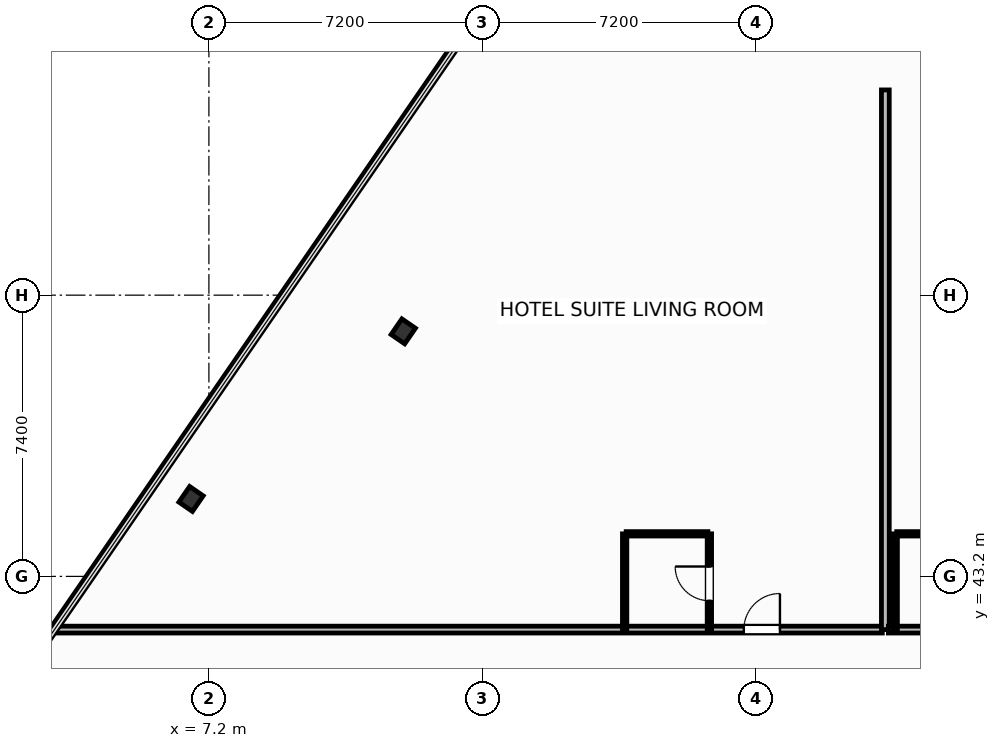
"""IFC4 building model, lengths in metres.
Left out: names, types, materials, properties, quantities, classifications, styles, units other than length and angle.
Written with IfcOpenShell. Run it as: python <this file> out.ifc"""

import sys

from ifc_helpers import new_model, si_unit, direction, frame, frame_2d, origin, origin_2d, place, context, subcontext, project, spatial, rectangle, i_section, extrude, element, fill, save


model = new_model("IFC4")
c1 = context("Model", 3, precision=1e-05, world=origin(), true_north=direction((0.0, 1.0)))
c2 = subcontext(c1, "Body", "Model", "MODEL_VIEW")
j1 = project(units=[si_unit("LENGTHUNIT", "METRE"), si_unit("PLANEANGLEUNIT", "RADIAN")], contexts=[c1])
p1 = place(None, origin())
s1 = spatial("IfcSite", under=j1, at=p1, CompositionType="ELEMENT")
p2 = place(p1, origin())
s2 = spatial("IfcBuilding", under=s1, at=p2, CompositionType="ELEMENT")
p3 = place(p2, frame((0.0, 0.0, 64.0)))
s3 = spatial("IfcBuildingStorey", under=s2, at=p3, CompositionType="ELEMENT", Elevation=64.0)
for number, where, z_axis, x_axis in (
    (1, (12.315, 49.647, 0.0), (0.0, 0.0, 1.0), (0.824, -0.567, 0.0)),
    (2, (6.73, 45.238, 0.0), (0.0, 0.0, 1.0), (0.824, -0.567, 0.0)),
):
    element("IfcColumn", number, at=place(p3, frame(where, z_axis=z_axis, x_axis=x_axis)), inside=s3, PredefinedType="COLUMN", context=c2, shape_type="SweptSolid", body=[
        extrude(i_section(OverallWidth=0.432, OverallDepth=0.498, WebThickness=0.056, FlangeThickness=0.089, FilletRadius=0.025, at=origin_2d()), origin(), (0.0, 0.0, 1.0), 3.7),
    ])
p4 = place(p3, frame((44.882, 51.962, 0.0), z_axis=(0.0, 0.0, 1.0), x_axis=(-0.823534427573, 0.567266292497, 0.0)))
e3 = element("IfcWall", 3, at=p4, inside=s3, PredefinedType="SOLIDWALL", context=c2, shape_type="SweptSolid", body=[
    extrude(rectangle(XDim=23.147, YDim=0.22, at=frame_2d((11.574, 0.0))), origin(), (0.0, 0.0, 1.0), 2.73),
])
p5 = place(p4, frame((10.749, 0.0, 0.8)))
e4 = element("IfcOpeningElement", 4, at=p5, cuts=e3, PredefinedType="OPENING", context=c2, shape_type="SweptSolid", body=[
    extrude(rectangle(XDim=1.65, YDim=1.65, at=frame_2d((0.825, 0.825))), frame((0.0, 0.12, 0.0), z_axis=(0.0, -1.0, 0.0), x_axis=(1.0, 0.0, 0.0)), (0.0, 0.0, 1.0), 0.24),
])
p6 = place(p3, frame((3.176, 41.8, 0.0), z_axis=(0.0, 0.0, 1.0), x_axis=(1.0, 0.0, 0.0)))
e5 = element("IfcWall", 5, at=p6, inside=s3, PredefinedType="PARTITIONING", context=c2, shape_type="SweptSolid", body=[
    extrude(rectangle(XDim=21.744, YDim=0.18, at=frame_2d((10.872, 0.0))), origin(), (0.0, 0.0, 1.0), 3.45),
])
p7 = place(p6, frame((18.101, 0.0, 0.0)))
e6 = element("IfcOpeningElement", 6, at=p7, cuts=e5, PredefinedType="OPENING", context=c2, shape_type="SweptSolid", body=[
    extrude(rectangle(XDim=0.95, YDim=2.15, at=frame_2d((0.475, 1.075))), frame((0.0, 0.1, 0.0), z_axis=(0.0, -1.0, 0.0), x_axis=(1.0, 0.0, 0.0)), (0.0, 0.0, 1.0), 0.2),
])
p8 = place(p3, frame((18.18, 44.32, 0.0), z_axis=(0.0, 0.0, 1.0), x_axis=(1.0, 0.0, 0.0)))
e7 = element("IfcWall", 7, at=p8, inside=s3, PredefinedType="PARTITIONING", context=c2, shape_type="SweptSolid", body=[
    extrude(rectangle(XDim=2.15, YDim=0.115, at=frame_2d((1.075, 0.0))), origin(), (0.0, 0.0, 1.0), 3.45),
])
p9 = place(p3, frame((20.37, 41.8, 0.0), z_axis=(0.0, 0.0, 1.0), x_axis=(0.0, 1.0, 0.0)))
e8 = element("IfcWall", 8, at=p9, inside=s3, PredefinedType="PARTITIONING", context=c2, shape_type="SweptSolid", body=[
    extrude(rectangle(XDim=2.52, YDim=0.115, at=frame_2d((1.26, 0.0))), origin(), (0.0, 0.0, 1.0), 3.45),
])
p10 = place(p9, frame((0.76, 0.0, 0.0)))
e9 = element("IfcOpeningElement", 9, at=p10, cuts=e8, PredefinedType="OPENING", context=c2, shape_type="SweptSolid", body=[
    extrude(rectangle(XDim=0.9, YDim=2.05, at=frame_2d((0.45, 1.025))), frame((0.0, 0.067, 0.0), z_axis=(0.0, -1.0, 0.0), x_axis=(1.0, 0.0, 0.0)), (0.0, 0.0, 1.0), 0.135),
])
p11 = place(p3, frame((18.14, 41.8, 0.0), z_axis=(0.0, 0.0, 1.0), x_axis=(0.0, 1.0, 0.0)))
e10 = element("IfcWall", 10, at=p11, inside=s3, PredefinedType="PARTITIONING", context=c2, shape_type="SweptSolid", body=[
    extrude(rectangle(XDim=2.52, YDim=0.115, at=frame_2d((1.26, 0.0))), origin(), (0.0, 0.0, 1.0), 3.45),
])
p12 = place(p3, frame((25.0, 41.8, 0.0), z_axis=(0.0, 0.0, 1.0), x_axis=(0.0, 1.0, 0.0)))
e11 = element("IfcWall", 11, at=p12, inside=s3, PredefinedType="PARTITIONING", context=c2, shape_type="SweptSolid", body=[
    extrude(rectangle(XDim=14.2, YDim=0.205, at=frame_2d((7.1, 0.0))), origin(), (0.0, 0.0, 1.0), 3.45),
])
p13 = place(p3, frame((25.08, 41.8, 0.0), z_axis=(0.0, 0.0, 1.0), x_axis=(1.0, 0.0, 0.0)))
e12 = element("IfcWall", 12, at=p13, inside=s3, PredefinedType="PARTITIONING", context=c2, shape_type="SweptSolid", body=[
    extrude(rectangle(XDim=6.34, YDim=0.18, at=frame_2d((3.17, 0.0))), origin(), (0.0, 0.0, 1.0), 3.45),
])
p14 = place(p13, frame((3.274, 0.0, 0.0)))
e13 = element("IfcOpeningElement", 13, at=p14, cuts=e12, PredefinedType="OPENING", context=c2, shape_type="SweptSolid", body=[
    extrude(rectangle(XDim=0.95, YDim=2.15, at=frame_2d((0.475, 1.075))), frame((0.0, 0.1, 0.0), z_axis=(0.0, -1.0, 0.0), x_axis=(1.0, 0.0, 0.0)), (0.0, 0.0, 1.0), 0.2),
])
p15 = place(p3, frame((25.3, 44.32, 0.0), z_axis=(0.0, 0.0, 1.0), x_axis=(1.0, 0.0, 0.0)))
e14 = element("IfcWall", 14, at=p15, inside=s3, PredefinedType="PARTITIONING", context=c2, shape_type="SweptSolid", body=[
    extrude(rectangle(XDim=2.124, YDim=0.115, at=frame_2d((1.062, 0.0))), origin(), (0.0, 0.0, 1.0), 3.45),
])
p16 = place(p3, frame((25.26, 41.8, 0.0), z_axis=(0.0, 0.0, 1.0), x_axis=(0.0, 1.0, 0.0)))
e15 = element("IfcWall", 15, at=p16, inside=s3, PredefinedType="PARTITIONING", context=c2, shape_type="SweptSolid", body=[
    extrude(rectangle(XDim=2.52, YDim=0.115, at=frame_2d((1.26, 0.0))), origin(), (0.0, 0.0, 1.0), 3.45),
])
p17 = place(p7, origin())
e16 = element("IfcDoor", 16, at=p17, inside=s3, OperationType="SINGLE_SWING_RIGHT", PredefinedType="DOOR", context=c2, shape_type="SweptSolid", body=[
    extrude(rectangle(XDim=0.95, YDim=2.15, at=frame_2d((0.475, 1.075))), frame((0.0, 0.025, 0.0), z_axis=(0.0, -1.0, 0.0), x_axis=(1.0, 0.0, 0.0)), (0.0, 0.0, 1.0), 0.05),
])
fill(e6, e16)
p18 = place(p10, origin())
e17 = element("IfcDoor", 17, at=p18, inside=s3, OperationType="SINGLE_SWING_RIGHT", PredefinedType="DOOR", context=c2, shape_type="SweptSolid", body=[
    extrude(rectangle(XDim=0.9, YDim=2.05, at=frame_2d((0.45, 1.025))), frame((0.0, 0.025, 0.0), z_axis=(0.0, -1.0, 0.0), x_axis=(1.0, 0.0, 0.0)), (0.0, 0.0, 1.0), 0.05),
])
fill(e9, e17)
save(model, sys.argv[1])
